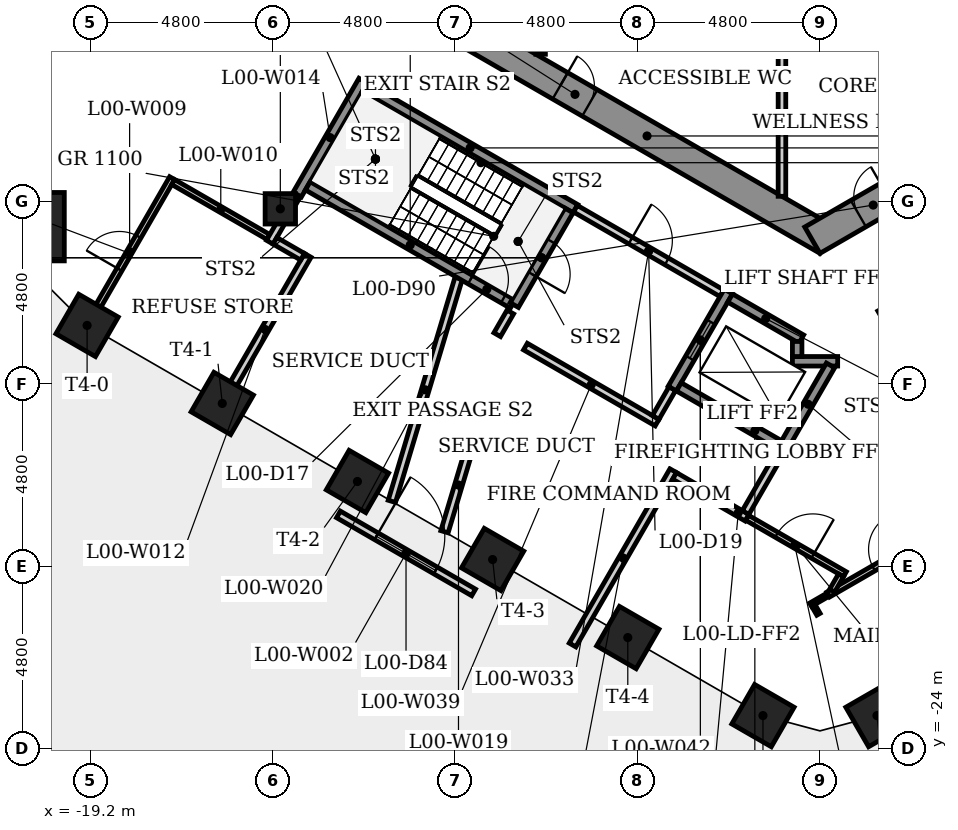
"""IFC4 building model, lengths in metres.
Left out: names, types, materials, properties, quantities, classifications, styles, units other than length and angle.
Written with IfcOpenShell. Run it as: python <this file> out.ifc"""

import sys

from ifc_helpers import new_model, si_unit, direction, frame, frame_2d, origin, origin_2d, place, context, subcontext, project, spatial, rectangle, extrude, element, fill, save


model = new_model("IFC4")
c1 = context("Model", 3, precision=1e-05, world=origin(), true_north=direction((0.0, 1.0)))
c2 = subcontext(c1, "Body", "Model", "MODEL_VIEW")
j1 = project(units=[si_unit("LENGTHUNIT", "METRE"), si_unit("PLANEANGLEUNIT", "RADIAN")], contexts=[c1])
p1 = place(None, origin())
s1 = spatial("IfcSite", under=j1, at=p1, CompositionType="ELEMENT")
p2 = place(p1, origin())
s2 = spatial("IfcBuilding", under=s1, at=p2, CompositionType="ELEMENT")
p3 = place(p2, origin())
s3 = spatial("IfcBuildingStorey", under=s2, at=p3, CompositionType="ELEMENT", Elevation=0.0)
p4 = place(p3, frame((-9.3, -5.138, -0.5), z_axis=(0.0, 0.0, 1.0), x_axis=(0.866023993627, -0.500002442456, 0.0)))
e1 = element("IfcWall", 1, at=p4, inside=s3, PredefinedType="SHEAR", context=c2, shape_type="SweptSolid", body=[
    extrude(rectangle(XDim=10.97, YDim=0.8, at=frame_2d((5.485, 0.0))), origin(), (0.0, 0.0, 1.0), 7.5),
])
p5 = place(p4, frame((2.845, 0.0, 0.5)))
e2 = element("IfcOpeningElement", 2, at=p5, cuts=e1, PredefinedType="OPENING", context=c2, shape_type="SweptSolid", body=[
    extrude(rectangle(XDim=0.9, YDim=2.1, at=frame_2d((0.45, 1.05))), frame((0.0, 0.41, 0.0), z_axis=(0.0, -1.0, 0.0), x_axis=(1.0, 0.0, 0.0)), (0.0, 0.0, 1.0), 0.82),
])
p6 = place(p3, frame((-0.2, -10.623, -0.5), z_axis=(0.0, 0.0, 1.0), x_axis=(0.866023993627, 0.500002442456, 0.0)))
e3 = element("IfcWall", 3, at=p6, inside=s3, PredefinedType="SHEAR", context=c2, shape_type="SweptSolid", body=[
    extrude(rectangle(XDim=10.97, YDim=0.8, at=frame_2d((5.485, 0.0))), origin(), (0.0, 0.0, 1.0), 7.5),
])
p7 = place(p6, frame((1.398, 0.0, 0.5)))
e4 = element("IfcOpeningElement", 4, at=p7, cuts=e3, PredefinedType="OPENING", context=c2, shape_type="SweptSolid", body=[
    extrude(rectangle(XDim=0.9, YDim=2.1, at=frame_2d((0.45, 1.05))), frame((0.0, 0.41, 0.0), z_axis=(0.0, -1.0, 0.0), x_axis=(1.0, 0.0, 0.0)), (0.0, 0.0, 1.0), 0.82),
])
p8 = place(p6, frame((8.032, 0.0, 0.5)))
e5 = element("IfcOpeningElement", 5, at=p8, cuts=e3, PredefinedType="OPENING", context=c2, shape_type="SweptSolid", body=[
    extrude(rectangle(XDim=0.9, YDim=2.1, at=frame_2d((0.45, 1.05))), frame((0.0, 0.41, 0.0), z_axis=(0.0, -1.0, 0.0), x_axis=(1.0, 0.0, 0.0)), (0.0, 0.0, 1.0), 0.82),
])
p9 = place(p3, frame((-20.785, -10.268, -0.5), z_axis=(0.0, 0.0, 1.0), x_axis=(-1.0, 0.0, 0.0)))
e6 = element("IfcColumn", 6, at=p9, inside=s3, PredefinedType="COLUMN", context=c2, shape_type="SweptSolid", body=[
    extrude(rectangle(XDim=1.8, YDim=1.8, at=origin_2d()), origin(), (0.0, 0.0, 1.0), 7.5),
])
for number, where, z_axis, x_axis in (
    (7, (-19.285, -12.866, -0.5), (0.0, 0.0, 1.0), (-0.5, -0.866, 0.0)),
    (8, (-15.728, -14.92, -0.5), (0.0, 0.0, 1.0), (-0.5, -0.866, 0.0)),
    (9, (-12.171, -16.973, -0.5), (0.0, 0.0, 1.0), (-0.5, -0.866, 0.0)),
    (10, (-8.614, -19.027, -0.5), (0.0, 0.0, 1.0), (-0.5, -0.866, 0.0)),
    (11, (-5.057, -21.08, -0.5), (0.0, 0.0, 1.0), (-0.5, -0.866, 0.0)),
    (12, (-1.5, -23.134, -0.5), (0.0, 0.0, 1.0), (-0.5, -0.866, 0.0)),
    (13, (1.5, -23.134, -0.5), (0.0, 0.0, 1.0), (0.5, -0.866, 0.0)),
):
    element("IfcColumn", number, at=place(p3, frame(where, z_axis=z_axis, x_axis=x_axis)), inside=s3, PredefinedType="COLUMN", context=c2, shape_type="SweptSolid", body=[
        extrude(rectangle(XDim=1.2, YDim=1.2, at=origin_2d()), origin(), (0.0, 0.0, 1.0), 7.5),
    ])
p10 = place(p3, frame((-14.2, -9.798, -0.5), z_axis=(0.0, 0.0, 1.0), x_axis=(-1.0, 0.0, 0.0)))
e14 = element("IfcColumn", 14, at=p10, inside=s3, PredefinedType="COLUMN", context=c2, shape_type="SweptSolid", body=[
    extrude(rectangle(XDim=0.8, YDim=0.8, at=origin_2d()), origin(), (0.0, 0.0, 1.0), 7.5),
])
p11 = place(p3, frame((-12.671, -17.839, 0.0), z_axis=(0.0, 0.0, 1.0), x_axis=(0.865995510393, -0.500051773299, 0.0)))
e15 = element("IfcWall", 15, at=p11, inside=s3, PredefinedType="SOLIDWALL", context=c2, shape_type="SweptSolid", body=[
    extrude(rectangle(XDim=4.107, YDim=0.2, at=frame_2d((2.053, 0.0))), origin(), (0.0, 0.0, 1.0), 7.0),
])
p12 = place(p11, frame((1.154, 0.0, 0.0)))
e16 = element("IfcOpeningElement", 16, at=p12, cuts=e15, PredefinedType="OPENING", context=c2, shape_type="SweptSolid", body=[
    extrude(rectangle(XDim=1.8, YDim=2.6, at=frame_2d((0.9, 1.3))), frame((0.0, 0.11, 0.0), z_axis=(0.0, -1.0, 0.0), x_axis=(1.0, 0.0, 0.0)), (0.0, 0.0, 1.0), 0.22),
])
p13 = place(p11, frame((1.154, 0.0, 3.0)))
e17 = element("IfcOpeningElement", 17, at=p13, cuts=e15, PredefinedType="OPENING", context=c2, shape_type="SweptSolid", body=[
    extrude(rectangle(XDim=1.8, YDim=2.2, at=frame_2d((0.9, 1.1))), frame((0.0, 0.11, 0.0), z_axis=(0.0, -1.0, 0.0), x_axis=(1.0, 0.0, 0.0)), (0.0, 0.0, 1.0), 0.22),
])
p14 = place(p3, frame((-19.285, -12.866, 0.0), z_axis=(0.0, 0.0, 1.0), x_axis=(0.50000580312, 0.866022053326, 0.0)))
e18 = element("IfcWall", 18, at=p14, inside=s3, PredefinedType="PARTITIONING", context=c2, shape_type="SweptSolid", body=[
    extrude(rectangle(XDim=4.475, YDim=0.15, at=frame_2d((2.238, 0.0))), origin(), (0.0, 0.0, 1.0), 6.6),
])
p15 = place(p14, frame((1.7, 0.0, 0.0)))
e19 = element("IfcOpeningElement", 19, at=p15, cuts=e18, PredefinedType="OPENING", context=c2, shape_type="SweptSolid", body=[
    extrude(rectangle(XDim=1.0, YDim=2.1, at=frame_2d((0.5, 1.05))), frame((0.0, 0.085, 0.0), z_axis=(0.0, -1.0, 0.0), x_axis=(1.0, 0.0, 0.0)), (0.0, 0.0, 1.0), 0.17),
])
p16 = place(p3, frame((-17.02, -9.093, 0.0), z_axis=(0.0, 0.0, 1.0), x_axis=(0.86603803935, -0.499978113919, 0.0)))
e20 = element("IfcWall", 20, at=p16, inside=s3, PredefinedType="PARTITIONING", context=c2, shape_type="SweptSolid", body=[
    extrude(rectangle(XDim=2.893, YDim=0.15, at=frame_2d((1.447, 0.0))), origin(), (0.0, 0.0, 1.0), 6.6),
])
p17 = place(p3, frame((-15.728, -14.92, 0.0), z_axis=(0.0, 0.0, 1.0), x_axis=(0.499990139034, 0.866031096941, 0.0)))
e21 = element("IfcWall", 21, at=p17, inside=s3, PredefinedType="PLUMBINGWALL", context=c2, shape_type="SweptSolid", body=[
    extrude(rectangle(XDim=4.5, YDim=0.2, at=frame_2d((2.25, 0.0))), origin(), (0.0, 0.0, 1.0), 6.6),
])
p18 = place(p3, frame((-14.478, -10.676, 0.0), z_axis=(0.0, 0.0, 1.0), x_axis=(0.500015331954, 0.866016551696, 0.0)))
e22 = element("IfcWall", 22, at=p18, inside=s3, PredefinedType="PLUMBINGWALL", context=c2, shape_type="SweptSolid", body=[
    extrude(rectangle(XDim=1.66, YDim=0.2, at=frame_2d((0.83, 0.0))), origin(), (0.0, 0.0, 1.0), 6.6),
])
p19 = place(p3, frame((-13.755, -9.424, 0.0), z_axis=(0.0, 0.0, 1.0), x_axis=(0.500005140434, 0.866022435933, 0.0)))
e23 = element("IfcWall", 23, at=p19, inside=s3, PredefinedType="SHEAR", context=c2, shape_type="SweptSolid", body=[
    extrude(rectangle(XDim=3.464, YDim=0.25, at=frame_2d((1.732, 0.0))), origin(), (0.0, 0.0, 1.0), 6.6),
])
p20 = place(p3, frame((-13.614, -11.059, 0.0), z_axis=(0.0, 0.0, 1.0), x_axis=(-0.865996651801, 0.500049796589, 0.0)))
e24 = element("IfcWall", 24, at=p20, inside=s3, PredefinedType="PLUMBINGWALL", context=c2, shape_type="SweptSolid", body=[
    extrude(rectangle(XDim=0.839, YDim=0.2, at=frame_2d((0.42, 0.0))), origin(), (0.0, 0.0, 1.0), 6.6),
])
p21 = place(p3, frame((-11.977, -6.595, 0.0), z_axis=(0.0, 0.0, 1.0), x_axis=(0.866025499775, -0.499999833739, 0.0)))
e25 = element("IfcWall", 25, at=p21, inside=s3, PredefinedType="SHEAR", context=c2, shape_type="SweptSolid", body=[
    extrude(rectangle(XDim=6.4, YDim=0.25, at=frame_2d((3.2, 0.0))), origin(), (0.0, 0.0, 1.0), 6.6),
])
p22 = place(p3, frame((-9.88, -18.296, 0.0), z_axis=(0.0, 0.0, 1.0), x_axis=(0.286850320116, 0.957975414011, 0.0)))
e26 = element("IfcWall", 26, at=p22, inside=s3, PredefinedType="PLUMBINGWALL", context=c2, shape_type="SweptSolid", body=[
    extrude(rectangle(XDim=2.566, YDim=0.2, at=frame_2d((1.283, 0.0))), origin(), (0.0, 0.0, 1.0), 6.6),
])
p23 = place(p3, frame((-9.508, -11.625, 0.0), z_axis=(0.0, 0.0, 1.0), x_axis=(-0.286880018175, -0.957966520904, 0.0)))
e27 = element("IfcWall", 27, at=p23, inside=s3, PredefinedType="PLUMBINGWALL", context=c2, shape_type="SweptSolid", body=[
    extrude(rectangle(XDim=6.128, YDim=0.2, at=frame_2d((3.064, 0.0))), origin(), (0.0, 0.0, 1.0), 6.6),
])
p24 = place(p3, frame((-13.477, -9.193, 0.0), z_axis=(0.0, 0.0, 1.0), x_axis=(0.866026229868, -0.499998569178, 0.0)))
e28 = element("IfcWall", 28, at=p24, inside=s3, PredefinedType="SHEAR", context=c2, shape_type="SweptSolid", body=[
    extrude(rectangle(XDim=6.225, YDim=0.25, at=frame_2d((3.113, 0.0))), origin(), (0.0, 0.0, 1.0), 6.6),
])
p25 = place(p24, frame((4.94, 0.0, 0.0)))
e29 = element("IfcOpeningElement", 29, at=p25, cuts=e28, PredefinedType="OPENING", context=c2, shape_type="SweptSolid", body=[
    extrude(rectangle(XDim=1.0, YDim=2.1, at=frame_2d((0.5, 1.05))), frame((0.0, 0.135, 0.0), z_axis=(0.0, -1.0, 0.0), x_axis=(1.0, 0.0, 0.0)), (0.0, 0.0, 1.0), 0.27),
])
p26 = place(p3, frame((-8.493, -13.11, 0.0), z_axis=(0.0, 0.0, 1.0), x_axis=(0.499947218231, 0.866055875208, 0.0)))
e30 = element("IfcWall", 30, at=p26, inside=s3, PredefinedType="PARTITIONING", context=c2, shape_type="SweptSolid", body=[
    extrude(rectangle(XDim=0.689, YDim=0.2, at=frame_2d((0.345, 0.0))), origin(), (0.0, 0.0, 1.0), 6.6),
])
p27 = place(p3, frame((-7.35, -5.73, 0.0), z_axis=(0.0, 0.0, 1.0), x_axis=(0.0, 1.0, 0.0)))
e31 = element("IfcWall", 31, at=p27, inside=s3, PredefinedType="SHEAR", context=c2, shape_type="SweptSolid", body=[
    extrude(rectangle(XDim=4.055, YDim=0.25, at=frame_2d((2.028, 0.0))), origin(), (0.0, 0.0, 1.0), 6.6),
])
p28 = place(p3, frame((-6.605, -9.841, 0.0), z_axis=(0.0, 0.0, 1.0), x_axis=(-0.500011588718, -0.866018712932, 0.0)))
e32 = element("IfcWall", 32, at=p28, inside=s3, PredefinedType="SHEAR", context=c2, shape_type="SweptSolid", body=[
    extrude(rectangle(XDim=2.875, YDim=0.25, at=frame_2d((1.438, 0.0))), origin(), (0.0, 0.0, 1.0), 6.6),
])
p29 = place(p28, frame((0.938, 0.0, 0.0)))
e33 = element("IfcOpeningElement", 33, at=p29, cuts=e32, PredefinedType="OPENING", context=c2, shape_type="SweptSolid", body=[
    extrude(rectangle(XDim=1.0, YDim=2.1, at=frame_2d((0.5, 1.05))), frame((0.0, 0.135, 0.0), z_axis=(0.0, -1.0, 0.0), x_axis=(1.0, 0.0, 0.0)), (0.0, 0.0, 1.0), 0.27),
])
p30 = place(p3, frame((-6.435, -9.795, 0.0), z_axis=(0.0, 0.0, 1.0), x_axis=(0.866012907634, -0.500021643343, 0.0)))
e34 = element("IfcWall", 34, at=p30, inside=s3, PredefinedType="PARTITIONING", context=c2, shape_type="SweptSolid", body=[
    extrude(rectangle(XDim=4.45, YDim=0.2, at=frame_2d((2.225, 0.0))), origin(), (0.0, 0.0, 1.0), 6.6),
])
p31 = place(p30, frame((1.675, 0.0, 0.0)))
e35 = element("IfcOpeningElement", 35, at=p31, cuts=e34, PredefinedType="OPENING", context=c2, shape_type="SweptSolid", body=[
    extrude(rectangle(XDim=1.1, YDim=2.1, at=frame_2d((0.55, 1.05))), frame((0.0, 0.11, 0.0), z_axis=(0.0, -1.0, 0.0), x_axis=(1.0, 0.0, 0.0)), (0.0, 0.0, 1.0), 0.22),
])
p32 = place(p3, frame((-4.286, -15.423, 0.0), z_axis=(0.0, 0.0, 1.0), x_axis=(-0.866026010844, 0.49999894854, 0.0)))
e36 = element("IfcWall", 36, at=p32, inside=s3, PredefinedType="PLUMBINGWALL", context=c2, shape_type="SweptSolid", body=[
    extrude(rectangle(XDim=4.0, YDim=0.2, at=frame_2d((2.0, 0.0))), origin(), (0.0, 0.0, 1.0), 6.6),
])
p33 = place(p3, frame((-3.862, -16.689, 0.0), z_axis=(0.0, 0.0, 1.0), x_axis=(-0.499996467947, -0.866027443007, 0.0)))
e37 = element("IfcWall", 37, at=p33, inside=s3, PredefinedType="PLUMBINGWALL", context=c2, shape_type="SweptSolid", body=[
    extrude(rectangle(XDim=5.296, YDim=0.2, at=frame_2d((2.648, 0.0))), origin(), (0.0, 0.0, 1.0), 6.6),
])
p34 = place(p3, frame((-3.885, -14.529, 0.0), z_axis=(0.0, 0.0, 1.0), x_axis=(-0.499859285417, -0.866106630146, 0.0)))
e38 = element("IfcWall", 38, at=p34, inside=s3, PredefinedType="PLUMBINGWALL", context=c2, shape_type="SweptSolid", body=[
    extrude(rectangle(XDim=0.875, YDim=0.2, at=frame_2d((0.438, 0.0))), origin(), (0.0, 0.0, 1.0), 6.6),
])
p35 = place(p3, frame((-2.41, -11.974, 0.0), z_axis=(0.0, 0.0, 1.0), x_axis=(-0.500001826776, -0.866024349092, 0.0)))
e39 = element("IfcWall", 39, at=p35, inside=s3, PredefinedType="SHEAR", context=c2, shape_type="SweptSolid", body=[
    extrude(rectangle(XDim=2.95, YDim=0.25, at=frame_2d((1.475, 0.0))), origin(), (0.0, 0.0, 1.0), 6.6),
])
p36 = place(p35, frame((0.925, 0.0, 0.0)))
e40 = element("IfcOpeningElement", 40, at=p36, cuts=e39, PredefinedType="OPENING", context=c2, shape_type="SweptSolid", body=[
    extrude(rectangle(XDim=1.1, YDim=2.1, at=frame_2d((0.55, 1.05))), frame((0.0, 0.135, 0.0), z_axis=(0.0, -1.0, 0.0), x_axis=(1.0, 0.0, 0.0)), (0.0, 0.0, 1.0), 0.27),
])
p37 = place(p3, frame((-2.364, -12.145, 0.0), z_axis=(0.0, 0.0, 1.0), x_axis=(0.86603892542, -0.499976579108, 0.0)))
e41 = element("IfcWall", 41, at=p37, inside=s3, PredefinedType="SHEAR", context=c2, shape_type="SweptSolid", body=[
    extrude(rectangle(XDim=2.162, YDim=0.25, at=frame_2d((1.081, 0.0))), origin(), (0.0, 0.0, 1.0), 6.6),
])
p38 = place(p3, frame((-1.92, -17.926, 0.0), z_axis=(0.0, 0.0, 1.0), x_axis=(0.866017493347, -0.500013701029, 0.0)))
e42 = element("IfcWall", 42, at=p38, inside=s3, PredefinedType="PARTITIONING", context=c2, shape_type="SweptSolid", body=[
    extrude(rectangle(XDim=2.975, YDim=0.15, at=frame_2d((1.488, 0.0))), origin(), (0.0, 0.0, 1.0), 6.6),
])
p39 = place(p38, frame((0.9, 0.0, 0.0)))
e43 = element("IfcOpeningElement", 43, at=p39, cuts=e42, PredefinedType="OPENING", context=c2, shape_type="SweptSolid", body=[
    extrude(rectangle(XDim=1.1, YDim=2.1, at=frame_2d((0.55, 1.05))), frame((0.0, 0.085, 0.0), z_axis=(0.0, -1.0, 0.0), x_axis=(1.0, 0.0, 0.0)), (0.0, 0.0, 1.0), 0.17),
])
p40 = place(p3, frame((-1.92, -17.926, 0.0), z_axis=(0.0, 0.0, 1.0), x_axis=(-0.86605622881, 0.499946605688, 0.0)))
e44 = element("IfcWall", 44, at=p40, inside=s3, PredefinedType="PLUMBINGWALL", context=c2, shape_type="SweptSolid", body=[
    extrude(rectangle(XDim=2.2, YDim=0.2, at=frame_2d((1.1, 0.0))), origin(), (0.0, 0.0, 1.0), 6.6),
])
p41 = place(p3, frame((-1.0, -5.275, 0.0), z_axis=(0.0, 0.0, 1.0), x_axis=(0.0, -1.0, 0.0)))
e45 = element("IfcWall", 45, at=p41, inside=s3, PredefinedType="PARTITIONING", context=c2, shape_type="SweptSolid", body=[
    extrude(rectangle(XDim=4.194, YDim=0.2, at=frame_2d((2.097, 0.0))), origin(), (0.0, 0.0, 1.0), 6.6),
])
p42 = place(p3, frame((-0.856, -16.133, 0.0), z_axis=(0.0, 0.0, 1.0), x_axis=(-0.866021716278, 0.500006386895, 0.0)))
e46 = element("IfcWall", 46, at=p42, inside=s3, PredefinedType="SHEAR", context=c2, shape_type="SweptSolid", body=[
    extrude(rectangle(XDim=3.3, YDim=0.25, at=frame_2d((1.65, 0.0))), origin(), (0.0, 0.0, 1.0), 6.6),
])
p43 = place(p3, frame((-1.027, -16.179, 0.0), z_axis=(0.0, 0.0, 1.0), x_axis=(-0.499923224849, -0.866069725401, 0.0)))
e47 = element("IfcWall", 47, at=p43, inside=s3, PredefinedType="PLUMBINGWALL", context=c2, shape_type="SweptSolid", body=[
    extrude(rectangle(XDim=1.86, YDim=0.2, at=frame_2d((0.93, 0.0))), origin(), (0.0, 0.0, 1.0), 6.6),
])
p44 = place(p3, frame((-0.725, -13.81, 0.0), z_axis=(0.0, 0.0, 1.0), x_axis=(1.0, 0.0, 0.0)))
e48 = element("IfcWall", 48, at=p44, inside=s3, PredefinedType="SHEAR", context=c2, shape_type="SweptSolid", body=[
    extrude(rectangle(XDim=1.191, YDim=0.25, at=frame_2d((0.595, 0.0))), origin(), (0.0, 0.0, 1.0), 6.6),
])
p45 = place(p3, frame((-0.6, -13.289, 0.0), z_axis=(0.0, 0.0, 1.0), x_axis=(0.0, -1.0, 0.0)))
e49 = element("IfcWall", 49, at=p45, inside=s3, PredefinedType="SHEAR", context=c2, shape_type="SweptSolid", body=[
    extrude(rectangle(XDim=0.396, YDim=0.25, at=frame_2d((0.198, 0.0))), origin(), (0.0, 0.0, 1.0), 7.0),
])
p46 = place(p3, frame((-0.243, -20.215, 0.0), z_axis=(0.0, 0.0, 1.0), x_axis=(0.866032814021, 0.499987164874, 0.0)))
e50 = element("IfcWall", 50, at=p46, inside=s3, PredefinedType="PARTITIONING", context=c2, shape_type="SweptSolid", body=[
    extrude(rectangle(XDim=0.532, YDim=0.1, at=frame_2d((0.266, 0.0))), origin(), (0.0, 0.0, 1.0), 6.6),
])
p47 = place(p3, frame((-0.039, -20.468, 0.0), z_axis=(0.0, 0.0, 1.0), x_axis=(-0.500007885066, 0.866020851292, 0.0)))
e51 = element("IfcWall", 51, at=p47, inside=s3, PredefinedType="PARTITIONING", context=c2, shape_type="SweptSolid", body=[
    extrude(rectangle(XDim=0.271, YDim=0.1, at=frame_2d((0.136, 0.0))), origin(), (0.0, 0.0, 1.0), 6.6),
])
p48 = place(p3, frame((0.217, -19.948, 0.0), z_axis=(0.0, 0.0, 1.0), x_axis=(0.866033964044, 0.499985172903, 0.0)))
e52 = element("IfcWall", 52, at=p48, inside=s3, PredefinedType="PARTITIONING", context=c2, shape_type="SweptSolid", body=[
    extrude(rectangle(XDim=3.7, YDim=0.15, at=frame_2d((1.85, 0.0))), origin(), (0.0, 0.0, 1.0), 6.6),
])
p49 = place(p48, frame((1.38, 0.0, 0.0)))
e53 = element("IfcOpeningElement", 53, at=p49, cuts=e52, PredefinedType="OPENING", context=c2, shape_type="SweptSolid", body=[
    extrude(rectangle(XDim=1.0, YDim=2.1, at=frame_2d((0.5, 1.05))), frame((0.0, 0.085, 0.0), z_axis=(0.0, -1.0, 0.0), x_axis=(1.0, 0.0, 0.0)), (0.0, 0.0, 1.0), 0.17),
])
p50 = place(p3, frame((0.278, -13.918, 0.0), z_axis=(0.0, 0.0, 1.0), x_axis=(-0.49998806882, -0.866032292145, 0.0)))
e54 = element("IfcWall", 54, at=p50, inside=s3, PredefinedType="SHEAR", context=c2, shape_type="SweptSolid", body=[
    extrude(rectangle(XDim=2.36, YDim=0.25, at=frame_2d((1.18, 0.0))), origin(), (0.0, 0.0, 1.0), 7.0),
])
p51 = place(p3, frame((0.554, -19.441, 0.0), z_axis=(0.0, 0.0, 1.0), x_axis=(-0.499842898591, -0.866116087328, 0.0)))
e55 = element("IfcWall", 55, at=p51, inside=s3, PredefinedType="PARTITIONING", context=c2, shape_type="SweptSolid", body=[
    extrude(rectangle(XDim=0.468, YDim=0.15, at=frame_2d((0.234, 0.0))), origin(), (0.0, 0.0, 1.0), 6.6),
])
p52 = place(p3, frame((1.585, -12.595, 0.0), z_axis=(0.0, 0.0, 1.0), x_axis=(0.866036417653, 0.499980922934, 0.0)))
e56 = element("IfcWall", 56, at=p52, inside=s3, PredefinedType="SHEAR", context=c2, shape_type="SweptSolid", body=[
    extrude(rectangle(XDim=6.65, YDim=0.25, at=frame_2d((3.325, 0.0))), origin(), (0.0, 0.0, 1.0), 6.6),
])
p53 = place(p52, frame((5.275, 0.0, 0.0)))
e57 = element("IfcOpeningElement", 57, at=p53, cuts=e56, PredefinedType="OPENING", context=c2, shape_type="SweptSolid", body=[
    extrude(rectangle(XDim=1.0, YDim=2.1, at=frame_2d((0.5, 1.05))), frame((0.0, 0.135, 0.0), z_axis=(0.0, -1.0, 0.0), x_axis=(1.0, 0.0, 0.0)), (0.0, 0.0, 1.0), 0.27),
])
p54 = place(p12, origin())
e58 = element("IfcDoor", 58, at=p54, inside=s3, OperationType="DOUBLE_DOOR_DOUBLE_SWING", PredefinedType="DOOR", context=c2, shape_type="SweptSolid", body=[
    extrude(rectangle(XDim=1.8, YDim=2.6, at=frame_2d((0.9, 1.3))), frame((0.0, 0.025, 0.0), z_axis=(0.0, -1.0, 0.0), x_axis=(1.0, 0.0, 0.0)), (0.0, 0.0, 1.0), 0.05),
])
fill(e16, e58)
p55 = place(p13, origin())
e59 = element("IfcWindow", 59, at=p55, inside=s3, PartitioningType="SINGLE_PANEL", PredefinedType="WINDOW", context=c2, shape_type="SweptSolid", body=[
    extrude(rectangle(XDim=1.8, YDim=2.2, at=frame_2d((0.9, 1.1))), frame((0.0, 0.03, 0.0), z_axis=(0.0, -1.0, 0.0), x_axis=(1.0, 0.0, 0.0)), (0.0, 0.0, 1.0), 0.06),
])
fill(e17, e59)
p56 = place(p25, origin())
e60 = element("IfcDoor", 60, at=p56, inside=s3, OperationType="SINGLE_SWING_LEFT", PredefinedType="DOOR", context=c2, shape_type="SweptSolid", body=[
    extrude(rectangle(XDim=1.0, YDim=2.1, at=frame_2d((0.5, 1.05))), frame((0.0, 0.025, 0.0), z_axis=(0.0, -1.0, 0.0), x_axis=(1.0, 0.0, 0.0)), (0.0, 0.0, 1.0), 0.05),
])
fill(e29, e60)
p57 = place(p29, origin())
e61 = element("IfcDoor", 61, at=p57, inside=s3, OperationType="SINGLE_SWING_RIGHT", PredefinedType="DOOR", context=c2, shape_type="SweptSolid", body=[
    extrude(rectangle(XDim=1.0, YDim=2.1, at=frame_2d((0.5, 1.05))), frame((0.0, 0.025, 0.0), z_axis=(0.0, -1.0, 0.0), x_axis=(1.0, 0.0, 0.0)), (0.0, 0.0, 1.0), 0.05),
])
fill(e33, e61)
p58 = place(p31, origin())
e62 = element("IfcDoor", 62, at=p58, inside=s3, OperationType="SINGLE_SWING_LEFT", PredefinedType="DOOR", context=c2, shape_type="SweptSolid", body=[
    extrude(rectangle(XDim=1.1, YDim=2.1, at=frame_2d((0.55, 1.05))), frame((0.0, 0.025, 0.0), z_axis=(0.0, -1.0, 0.0), x_axis=(1.0, 0.0, 0.0)), (0.0, 0.0, 1.0), 0.05),
])
fill(e35, e62)
p59 = place(p36, origin())
e63 = element("IfcDoor", 63, at=p59, inside=s3, OperationType="SLIDING_TO_LEFT", PredefinedType="DOOR", context=c2, shape_type="SweptSolid", body=[
    extrude(rectangle(XDim=1.1, YDim=2.1, at=frame_2d((0.55, 1.05))), frame((0.0, 0.025, 0.0), z_axis=(0.0, -1.0, 0.0), x_axis=(1.0, 0.0, 0.0)), (0.0, 0.0, 1.0), 0.05),
])
fill(e40, e63)
p60 = place(p15, origin())
e64 = element("IfcDoor", 64, at=p60, inside=s3, OperationType="SINGLE_SWING_LEFT", PredefinedType="DOOR", context=c2, shape_type="SweptSolid", body=[
    extrude(rectangle(XDim=1.0, YDim=2.1, at=frame_2d((0.5, 1.05))), frame((0.0, 0.025, 0.0), z_axis=(0.0, -1.0, 0.0), x_axis=(1.0, 0.0, 0.0)), (0.0, 0.0, 1.0), 0.05),
])
fill(e19, e64)
p61 = place(p49, origin())
e65 = element("IfcDoor", 65, at=p61, inside=s3, OperationType="SINGLE_SWING_RIGHT", PredefinedType="DOOR", context=c2, shape_type="SweptSolid", body=[
    extrude(rectangle(XDim=1.0, YDim=2.1, at=frame_2d((0.5, 1.05))), frame((0.0, 0.025, 0.0), z_axis=(0.0, -1.0, 0.0), x_axis=(1.0, 0.0, 0.0)), (0.0, 0.0, 1.0), 0.05),
])
fill(e53, e65)
p62 = place(p39, origin())
e66 = element("IfcDoor", 66, at=p62, inside=s3, OperationType="SINGLE_SWING_RIGHT", PredefinedType="DOOR", context=c2, shape_type="SweptSolid", body=[
    extrude(rectangle(XDim=1.1, YDim=2.1, at=frame_2d((0.55, 1.05))), frame((0.0, 0.025, 0.0), z_axis=(0.0, -1.0, 0.0), x_axis=(1.0, 0.0, 0.0)), (0.0, 0.0, 1.0), 0.05),
])
fill(e43, e66)
p63 = place(p5, origin())
e67 = element("IfcDoor", 67, at=p63, inside=s3, OperationType="SINGLE_SWING_LEFT", PredefinedType="DOOR", context=c2, shape_type="SweptSolid", body=[
    extrude(rectangle(XDim=0.9, YDim=2.1, at=frame_2d((0.45, 1.05))), frame((0.0, 0.025, 0.0), z_axis=(0.0, -1.0, 0.0), x_axis=(1.0, 0.0, 0.0)), (0.0, 0.0, 1.0), 0.05),
])
fill(e2, e67)
p64 = place(p7, origin())
e68 = element("IfcDoor", 68, at=p64, inside=s3, OperationType="SINGLE_SWING_RIGHT", PredefinedType="DOOR", context=c2, shape_type="SweptSolid", body=[
    extrude(rectangle(XDim=0.9, YDim=2.1, at=frame_2d((0.45, 1.05))), frame((0.0, 0.025, 0.0), z_axis=(0.0, -1.0, 0.0), x_axis=(1.0, 0.0, 0.0)), (0.0, 0.0, 1.0), 0.05),
])
fill(e4, e68)
save(model, sys.argv[1])
